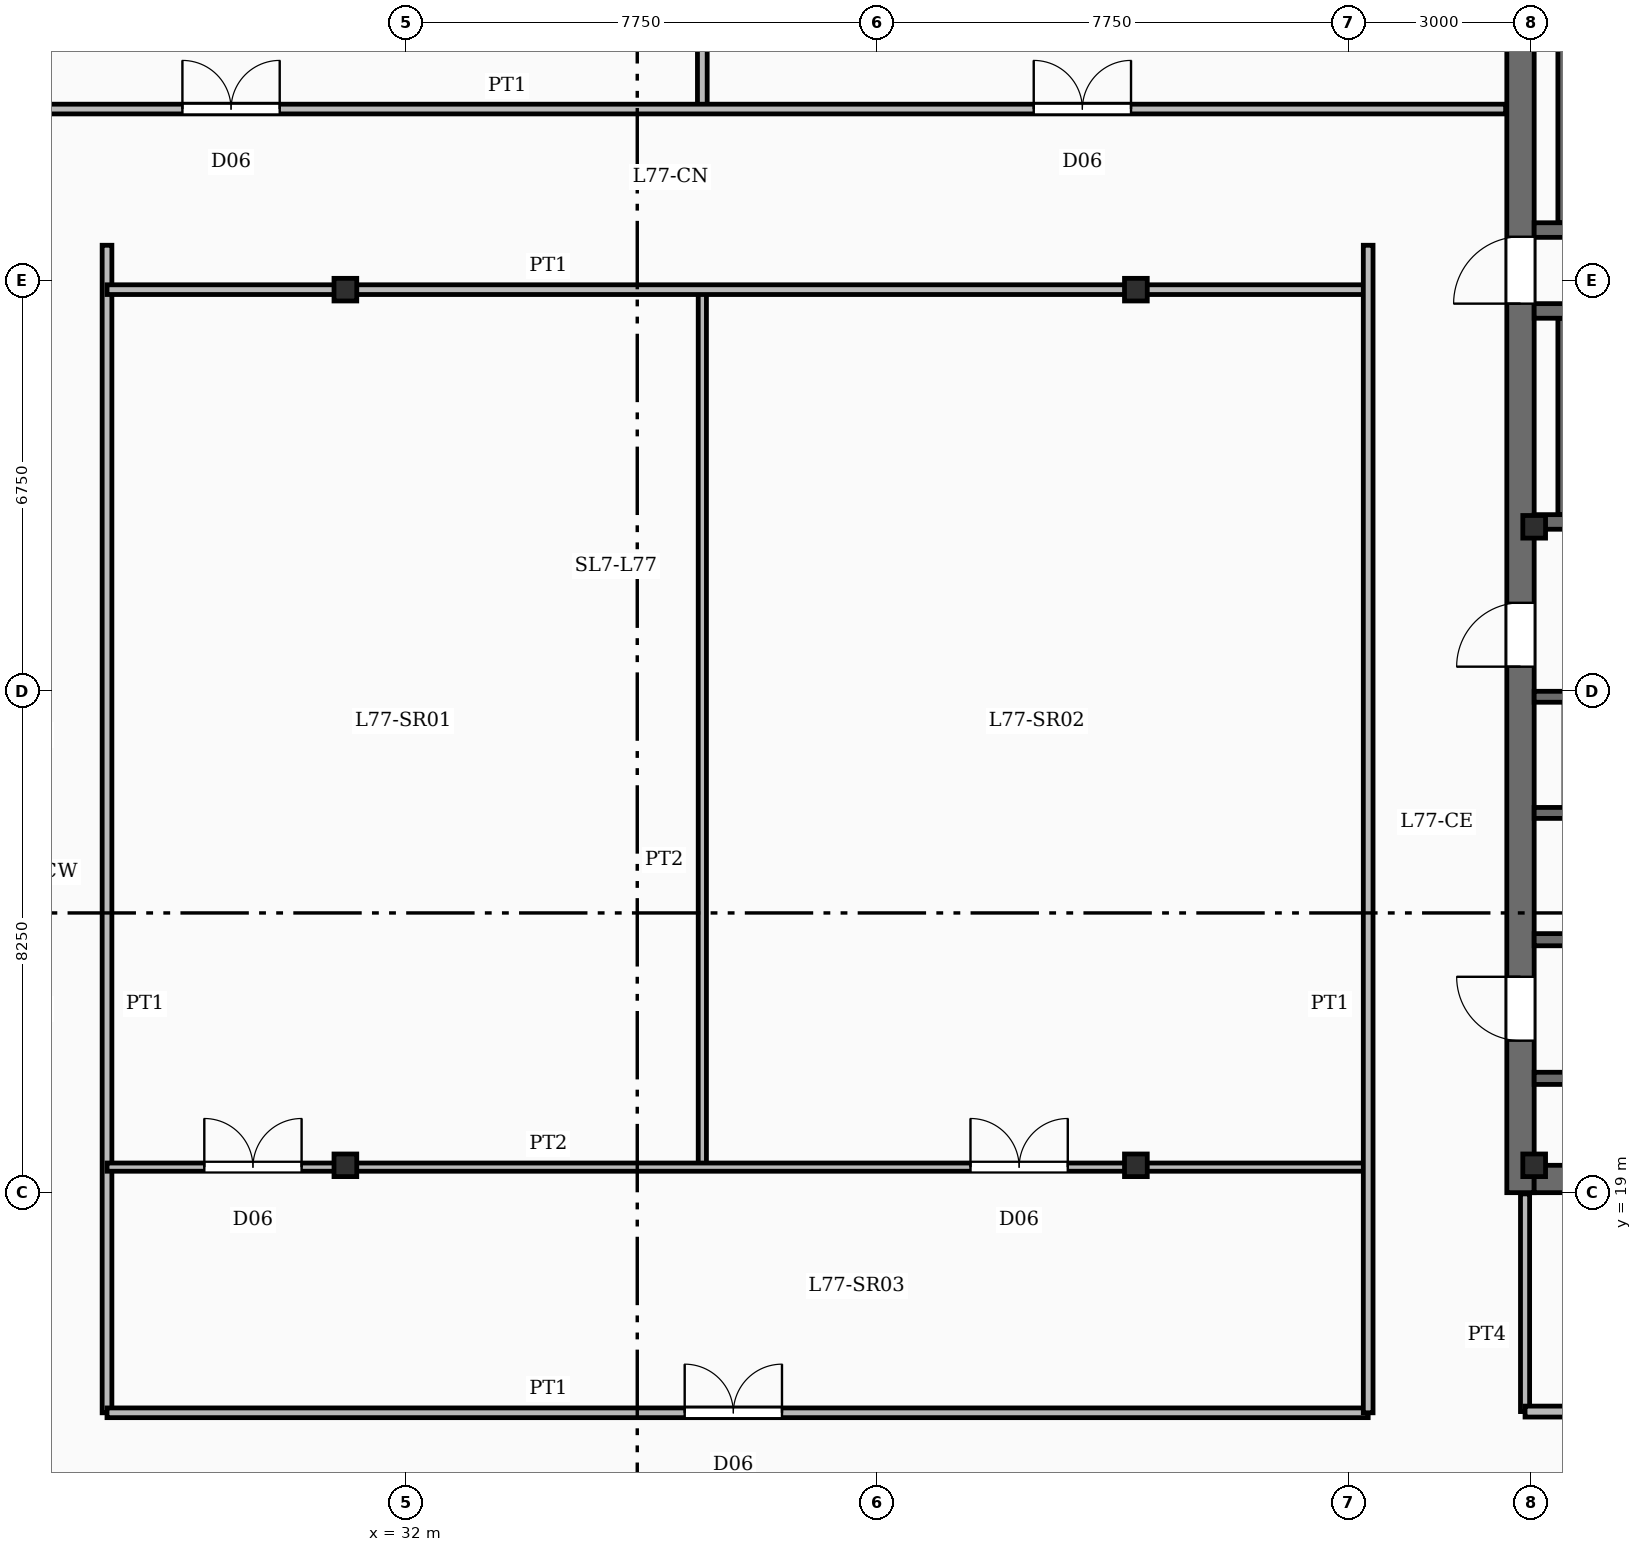
"""IFC4 building model, lengths in metres.
Left out: names, types, materials, properties, quantities, classifications, styles, units other than length and angle.
Written with IfcOpenShell. Run it as: python <this file> out.ifc"""

import sys

from ifc_helpers import new_model, si_unit, direction, frame, frame_2d, origin, origin_2d, place, context, subcontext, project, spatial, rectangle, i_section, extrude, element, fill, save


model = new_model("IFC4")
c1 = context("Model", 3, precision=1e-05, world=origin(), true_north=direction((0.0, 1.0)))
c2 = subcontext(c1, "Body", "Model", "MODEL_VIEW")
j1 = project(units=[si_unit("LENGTHUNIT", "METRE"), si_unit("PLANEANGLEUNIT", "RADIAN")], contexts=[c1])
p1 = place(None, origin())
s1 = spatial("IfcSite", under=j1, at=p1, CompositionType="ELEMENT")
p2 = place(p1, origin())
s2 = spatial("IfcBuilding", under=s1, at=p2, CompositionType="ELEMENT")
p3 = place(p2, frame((0.0, 0.0, 312.4)))
s3 = spatial("IfcBuildingStorey", under=s2, at=p3, CompositionType="ELEMENT", Elevation=312.4)
p4 = place(p3, frame((50.325, 19.0, -0.24), z_axis=(0.0, 0.0, 1.0), x_axis=(0.0, 1.0, 0.0)))
e1 = element("IfcWall", 1, at=p4, inside=s3, PredefinedType="SHEAR", context=c2, shape_type="SweptSolid", body=[
    extrude(rectangle(XDim=20.8, YDim=0.45, at=frame_2d((10.4, 0.0))), origin(), (0.0, 0.0, 1.0), 4.8),
])
p5 = place(p4, frame((2.5, 0.0, 0.24)))
e2 = element("IfcOpeningElement", 2, at=p5, cuts=e1, PredefinedType="OPENING", context=c2, shape_type="SweptSolid", body=[
    extrude(rectangle(XDim=1.05, YDim=2.15, at=frame_2d((0.525, 1.075))), frame((0.0, 0.235, 0.0), z_axis=(0.0, -1.0, 0.0), x_axis=(1.0, 0.0, 0.0)), (0.0, 0.0, 1.0), 0.47),
])
p6 = place(p4, frame((8.65, 0.0, 0.24)))
e3 = element("IfcOpeningElement", 3, at=p6, cuts=e1, PredefinedType="OPENING", context=c2, shape_type="SweptSolid", body=[
    extrude(rectangle(XDim=1.05, YDim=2.15, at=frame_2d((0.525, 1.075))), frame((0.0, 0.235, 0.0), z_axis=(0.0, -1.0, 0.0), x_axis=(1.0, 0.0, 0.0)), (0.0, 0.0, 1.0), 0.47),
])
p7 = place(p4, frame((14.62, 0.0, 0.24)))
e4 = element("IfcOpeningElement", 4, at=p7, cuts=e1, PredefinedType="OPENING", context=c2, shape_type="SweptSolid", body=[
    extrude(rectangle(XDim=1.1, YDim=2.15, at=frame_2d((0.55, 1.075))), frame((0.0, 0.235, 0.0), z_axis=(0.0, -1.0, 0.0), x_axis=(1.0, 0.0, 0.0)), (0.0, 0.0, 1.0), 0.47),
])
p8 = place(p3, frame((50.55, 19.225, -0.24), z_axis=(0.0, 0.0, 1.0), x_axis=(1.0, 0.0, 0.0)))
e5 = element("IfcWall", 5, at=p8, inside=s3, PredefinedType="SHEAR", context=c2, shape_type="SweptSolid", body=[
    extrude(rectangle(XDim=9.8, YDim=0.45, at=frame_2d((4.9, 0.0))), origin(), (0.0, 0.0, 1.0), 4.8),
])
for number, where, z_axis, x_axis in (
    (6, (50.55, 19.45, -0.24), (0.0, 0.0, 1.0), (1.0, 0.0, 0.0)),
    (7, (50.55, 29.95, -0.24), (0.0, 0.0, 1.0), (1.0, 0.0, 0.0)),
    (8, (31.0, 19.45, -0.24), (0.0, 0.0, 1.0), (1.0, 0.0, 0.0)),
    (9, (44.0, 19.45, -0.24), (0.0, 0.0, 1.0), (1.0, 0.0, 0.0)),
    (10, (31.0, 33.85, -0.24), (0.0, 0.0, 1.0), (1.0, 0.0, 0.0)),
    (11, (44.0, 33.85, -0.24), (0.0, 0.0, 1.0), (1.0, 0.0, 0.0)),
):
    element("IfcColumn", number, at=place(p3, frame(where, z_axis=z_axis, x_axis=x_axis)), inside=s3, PredefinedType="COLUMN", context=c2, shape_type="SweptSolid", body=[
        extrude(i_section(OverallWidth=0.374, OverallDepth=0.372, WebThickness=0.016, FlangeThickness=0.026, FilletRadius=0.02, at=origin_2d()), origin(), (0.0, 0.0, 1.0), 4.8),
    ])
p9 = place(p3, frame((60.35, 30.03, 0.0), z_axis=(0.0, 0.0, 1.0), x_axis=(-1.0, 0.0, 0.0)))
e12 = element("IfcWall", 12, at=p9, inside=s3, PredefinedType="SOLIDWALL", context=c2, shape_type="SweptSolid", body=[
    extrude(rectangle(XDim=9.8, YDim=0.24, at=frame_2d((4.9, 0.0))), origin(), (0.0, 0.0, 1.0), 4.56),
])
p10 = place(p9, frame((7.83, 0.0, 0.0)))
e13 = element("IfcOpeningElement", 13, at=p10, cuts=e12, PredefinedType="OPENING", context=c2, shape_type="SweptSolid", body=[
    extrude(rectangle(XDim=1.1, YDim=2.15, at=frame_2d((0.55, 1.075))), frame((0.0, 0.13, 0.0), z_axis=(0.0, -1.0, 0.0), x_axis=(1.0, 0.0, 0.0)), (0.0, 0.0, 1.0), 0.26),
])
p11 = place(p3, frame((50.55, 33.5, 0.0), z_axis=(0.0, 0.0, 1.0), x_axis=(1.0, 0.0, 0.0)))
e14 = element("IfcWall", 14, at=p11, inside=s3, PredefinedType="SOLIDWALL", context=c2, shape_type="SweptSolid", body=[
    extrude(rectangle(XDim=9.8, YDim=0.24, at=frame_2d((4.9, 0.0))), origin(), (0.0, 0.0, 1.0), 4.56),
])
p12 = place(p3, frame((51.06, 30.15, 0.0), z_axis=(0.0, 0.0, 1.0), x_axis=(0.0, 1.0, 0.0)))
e15 = element("IfcWall", 15, at=p12, inside=s3, PredefinedType="SOLIDWALL", context=c2, shape_type="SweptSolid", body=[
    extrude(rectangle(XDim=3.23, YDim=0.24, at=frame_2d((1.615, 0.0))), origin(), (0.0, 0.0, 1.0), 4.56),
])
p13 = place(p3, frame((60.35, 34.83, 0.0), z_axis=(0.0, 0.0, 1.0), x_axis=(-1.0, 0.0, 0.0)))
e16 = element("IfcWall", 16, at=p13, inside=s3, PredefinedType="SOLIDWALL", context=c2, shape_type="SweptSolid", body=[
    extrude(rectangle(XDim=9.8, YDim=0.24, at=frame_2d((4.9, 0.0))), origin(), (0.0, 0.0, 1.0), 4.56),
])
p14 = place(p13, frame((7.87, 0.0, 0.0)))
e17 = element("IfcOpeningElement", 17, at=p14, cuts=e16, PredefinedType="OPENING", context=c2, shape_type="SweptSolid", body=[
    extrude(rectangle(XDim=1.1, YDim=2.15, at=frame_2d((0.55, 1.075))), frame((0.0, 0.13, 0.0), z_axis=(0.0, -1.0, 0.0), x_axis=(1.0, 0.0, 0.0)), (0.0, 0.0, 1.0), 0.26),
])
p15 = place(p3, frame((51.06, 34.95, 0.0), z_axis=(0.0, 0.0, 1.0), x_axis=(0.0, 1.0, 0.0)))
e18 = element("IfcWall", 18, at=p15, inside=s3, PredefinedType="SOLIDWALL", context=c2, shape_type="SweptSolid", body=[
    extrude(rectangle(XDim=3.15, YDim=0.24, at=frame_2d((1.575, 0.0))), origin(), (0.0, 0.0, 1.0), 4.56),
])
p16 = place(p3, frame((50.55, 27.155, 0.0), z_axis=(0.0, 0.0, 1.0), x_axis=(1.0, 0.0, 0.0)))
e19 = element("IfcWall", 19, at=p16, inside=s3, PredefinedType="SOLIDWALL", context=c2, shape_type="SweptSolid", body=[
    extrude(rectangle(XDim=3.315, YDim=0.18, at=frame_2d((1.657, 0.0))), origin(), (0.0, 0.0, 1.0), 4.56),
])
p17 = place(p16, frame((1.235, 0.0, 0.0)))
e20 = element("IfcOpeningElement", 20, at=p17, cuts=e19, PredefinedType="OPENING", context=c2, shape_type="SweptSolid", body=[
    extrude(rectangle(XDim=1.35, YDim=2.3, at=frame_2d((0.675, 1.15))), frame((0.0, 0.1, 0.0), z_axis=(0.0, -1.0, 0.0), x_axis=(1.0, 0.0, 0.0)), (0.0, 0.0, 1.0), 0.2),
])
p18 = place(p3, frame((50.55, 25.245, 0.0), z_axis=(0.0, 0.0, 1.0), x_axis=(1.0, 0.0, 0.0)))
e21 = element("IfcWall", 21, at=p18, inside=s3, PredefinedType="SOLIDWALL", context=c2, shape_type="SweptSolid", body=[
    extrude(rectangle(XDim=3.315, YDim=0.18, at=frame_2d((1.657, 0.0))), origin(), (0.0, 0.0, 1.0), 4.56),
])
p19 = place(p3, frame((50.55, 20.88, 0.0), z_axis=(0.0, 0.0, 1.0), x_axis=(1.0, 0.0, 0.0)))
e22 = element("IfcWall", 22, at=p19, inside=s3, PredefinedType="SOLIDWALL", context=c2, shape_type="SweptSolid", body=[
    extrude(rectangle(XDim=9.8, YDim=0.2, at=frame_2d((4.9, 0.0))), origin(), (0.0, 0.0, 1.0), 3.62),
])
p20 = place(p19, frame((1.4, 0.0, 0.0)))
e23 = element("IfcOpeningElement", 23, at=p20, cuts=e22, PredefinedType="OPENING", context=c2, shape_type="SweptSolid", body=[
    extrude(rectangle(XDim=1.05, YDim=2.15, at=frame_2d((0.525, 1.075))), frame((0.0, 0.11, 0.0), z_axis=(0.0, -1.0, 0.0), x_axis=(1.0, 0.0, 0.0)), (0.0, 0.0, 1.0), 0.22),
])
p21 = place(p19, frame((5.5, 0.0, 0.0)))
e24 = element("IfcOpeningElement", 24, at=p21, cuts=e22, PredefinedType="OPENING", context=c2, shape_type="SweptSolid", body=[
    extrude(rectangle(XDim=1.05, YDim=2.15, at=frame_2d((0.525, 1.075))), frame((0.0, 0.11, 0.0), z_axis=(0.0, -1.0, 0.0), x_axis=(1.0, 0.0, 0.0)), (0.0, 0.0, 1.0), 0.22),
])
p22 = place(p3, frame((50.55, 23.16, 0.0), z_axis=(0.0, 0.0, 1.0), x_axis=(1.0, 0.0, 0.0)))
e25 = element("IfcWall", 25, at=p22, inside=s3, PredefinedType="SOLIDWALL", context=c2, shape_type="SweptSolid", body=[
    extrude(rectangle(XDim=3.33, YDim=0.2, at=frame_2d((1.665, 0.0))), origin(), (0.0, 0.0, 1.0), 3.62),
])
p23 = place(p22, frame((0.55, 0.0, 0.0)))
e26 = element("IfcOpeningElement", 26, at=p23, cuts=e25, PredefinedType="OPENING", context=c2, shape_type="SweptSolid", body=[
    extrude(rectangle(XDim=0.86, YDim=2.05, at=frame_2d((0.43, 1.025))), frame((0.0, 0.11, 0.0), z_axis=(0.0, -1.0, 0.0), x_axis=(1.0, 0.0, 0.0)), (0.0, 0.0, 1.0), 0.22),
])
p24 = place(p3, frame((50.4, 15.4, 0.0), z_axis=(0.0, 0.0, 1.0), x_axis=(1.0, 0.0, 0.0)))
e27 = element("IfcWall", 27, at=p24, inside=s3, PredefinedType="SOLIDWALL", context=c2, shape_type="SweptSolid", body=[
    extrude(rectangle(XDim=10.0, YDim=0.18, at=frame_2d((5.0, 0.0))), origin(), (0.0, 0.0, 1.0), 3.62),
])
p25 = place(p24, frame((1.94, 0.0, 0.0)))
e28 = element("IfcOpeningElement", 28, at=p25, cuts=e27, PredefinedType="OPENING", context=c2, shape_type="SweptSolid", body=[
    extrude(rectangle(XDim=0.92, YDim=2.1, at=frame_2d((0.46, 1.05))), frame((0.0, 0.1, 0.0), z_axis=(0.0, -1.0, 0.0), x_axis=(1.0, 0.0, 0.0)), (0.0, 0.0, 1.0), 0.2),
])
p26 = place(p24, frame((6.97, 0.0, 0.0)))
e29 = element("IfcOpeningElement", 29, at=p26, cuts=e27, PredefinedType="OPENING", context=c2, shape_type="SweptSolid", body=[
    extrude(rectangle(XDim=0.86, YDim=2.05, at=frame_2d((0.43, 1.025))), frame((0.0, 0.1, 0.0), z_axis=(0.0, -1.0, 0.0), x_axis=(1.0, 0.0, 0.0)), (0.0, 0.0, 1.0), 0.2),
])
p27 = place(p3, frame((50.4, 15.4, 0.0), z_axis=(0.0, 0.0, 1.0), x_axis=(0.0, 1.0, 0.0)))
e30 = element("IfcWall", 30, at=p27, inside=s3, PredefinedType="PARTITIONING", context=c2, shape_type="SweptSolid", body=[
    extrude(rectangle(XDim=3.58, YDim=0.15, at=frame_2d((1.79, 0.0))), origin(), (0.0, 0.0, 1.0), 3.62),
])
p28 = place(p3, frame((27.08, 19.42, 0.0), z_axis=(0.0, 0.0, 1.0), x_axis=(1.0, 0.0, 0.0)))
e31 = element("IfcWall", 31, at=p28, inside=s3, PredefinedType="PARTITIONING", context=c2, shape_type="SweptSolid", body=[
    extrude(rectangle(XDim=20.74, YDim=0.135, at=frame_2d((10.37, 0.0))), origin(), (0.0, 0.0, 1.0), 3.62),
])
p29 = place(p28, frame((1.6, 0.0, 0.0)))
e32 = element("IfcOpeningElement", 32, at=p29, cuts=e31, PredefinedType="OPENING", context=c2, shape_type="SweptSolid", body=[
    extrude(rectangle(XDim=1.6, YDim=2.15, at=frame_2d((0.8, 1.075))), frame((0.0, 0.077, 0.0), z_axis=(0.0, -1.0, 0.0), x_axis=(1.0, 0.0, 0.0)), (0.0, 0.0, 1.0), 0.155),
])
p30 = place(p28, frame((14.2, 0.0, 0.0)))
e33 = element("IfcOpeningElement", 33, at=p30, cuts=e31, PredefinedType="OPENING", context=c2, shape_type="SweptSolid", body=[
    extrude(rectangle(XDim=1.6, YDim=2.15, at=frame_2d((0.8, 1.075))), frame((0.0, 0.077, 0.0), z_axis=(0.0, -1.0, 0.0), x_axis=(1.0, 0.0, 0.0)), (0.0, 0.0, 1.0), 0.155),
])
p31 = place(p3, frame((27.08, 33.85, 0.0), z_axis=(0.0, 0.0, 1.0), x_axis=(1.0, 0.0, 0.0)))
e34 = element("IfcWall", 34, at=p31, inside=s3, PredefinedType="PARTITIONING", context=c2, shape_type="SweptSolid", body=[
    extrude(rectangle(XDim=20.74, YDim=0.16, at=frame_2d((10.37, 0.0))), origin(), (0.0, 0.0, 1.0), 3.62),
])
p32 = place(p3, frame((36.87, 19.42, 0.0), z_axis=(0.0, 0.0, 1.0), x_axis=(0.0, 1.0, 0.0)))
e35 = element("IfcWall", 35, at=p32, inside=s3, PredefinedType="PARTITIONING", context=c2, shape_type="SweptSolid", body=[
    extrude(rectangle(XDim=14.43, YDim=0.135, at=frame_2d((7.215, 0.0))), origin(), (0.0, 0.0, 1.0), 3.62),
])
p33 = place(p3, frame((27.08, 15.38, 0.0), z_axis=(0.0, 0.0, 1.0), x_axis=(1.0, 0.0, 0.0)))
e36 = element("IfcWall", 36, at=p33, inside=s3, PredefinedType="PARTITIONING", context=c2, shape_type="SweptSolid", body=[
    extrude(rectangle(XDim=20.74, YDim=0.16, at=frame_2d((10.37, 0.0))), origin(), (0.0, 0.0, 1.0), 3.62),
])
p34 = place(p33, frame((9.5, 0.0, 0.0)))
e37 = element("IfcOpeningElement", 37, at=p34, cuts=e36, PredefinedType="OPENING", context=c2, shape_type="SweptSolid", body=[
    extrude(rectangle(XDim=1.6, YDim=2.15, at=frame_2d((0.8, 1.075))), frame((0.0, 0.09, 0.0), z_axis=(0.0, -1.0, 0.0), x_axis=(1.0, 0.0, 0.0)), (0.0, 0.0, 1.0), 0.18),
])
for number, where, z_axis, x_axis in (
    (38, (27.08, 15.38, 0.0), (0.0, 0.0, 1.0), (0.0, 1.0, 0.0)),
    (39, (47.82, 15.38, 0.0), (0.0, 0.0, 1.0), (0.0, 1.0, 0.0)),
):
    element("IfcWall", number, at=place(p3, frame(where, z_axis=z_axis, x_axis=x_axis)), inside=s3, PredefinedType="PARTITIONING", context=c2, shape_type="SweptSolid", body=[
        extrude(rectangle(XDim=19.2, YDim=0.16, at=frame_2d((9.6, 0.0))), origin(), (0.0, 0.0, 1.0), 3.62),
    ])
p35 = place(p3, frame((24.82, 36.82, 0.0), z_axis=(0.0, 0.0, 1.0), x_axis=(1.0, 0.0, 0.0)))
e40 = element("IfcWall", 40, at=p35, inside=s3, PredefinedType="PARTITIONING", context=c2, shape_type="SweptSolid", body=[
    extrude(rectangle(XDim=25.26, YDim=0.16, at=frame_2d((12.63, 0.0))), origin(), (0.0, 0.0, 1.0), 3.62),
])
p36 = place(p35, frame((3.5, 0.0, 0.0)))
e41 = element("IfcOpeningElement", 41, at=p36, cuts=e40, PredefinedType="OPENING", context=c2, shape_type="SweptSolid", body=[
    extrude(rectangle(XDim=1.6, YDim=2.15, at=frame_2d((0.8, 1.075))), frame((0.0, 0.09, 0.0), z_axis=(0.0, -1.0, 0.0), x_axis=(1.0, 0.0, 0.0)), (0.0, 0.0, 1.0), 0.18),
])
p37 = place(p35, frame((17.5, 0.0, 0.0)))
e42 = element("IfcOpeningElement", 42, at=p37, cuts=e40, PredefinedType="OPENING", context=c2, shape_type="SweptSolid", body=[
    extrude(rectangle(XDim=1.6, YDim=2.15, at=frame_2d((0.8, 1.075))), frame((0.0, 0.09, 0.0), z_axis=(0.0, -1.0, 0.0), x_axis=(1.0, 0.0, 0.0)), (0.0, 0.0, 1.0), 0.18),
])
p38 = place(p3, frame((36.87, 36.82, 0.0), z_axis=(0.0, 0.0, 1.0), x_axis=(0.0, 1.0, 0.0)))
e43 = element("IfcWall", 43, at=p38, inside=s3, PredefinedType="PARTITIONING", context=c2, shape_type="SweptSolid", body=[
    extrude(rectangle(XDim=15.037, YDim=0.16, at=frame_2d((7.518, 0.0))), origin(), (0.0, 0.0, 1.0), 3.62),
])
p39 = place(p5, origin())
e44 = element("IfcDoor", 44, at=p39, inside=s3, OperationType="SINGLE_SWING_RIGHT", PredefinedType="DOOR", context=c2, shape_type="SweptSolid", body=[
    extrude(rectangle(XDim=1.05, YDim=2.15, at=frame_2d((0.525, 1.075))), frame((0.0, 0.025, 0.0), z_axis=(0.0, -1.0, 0.0), x_axis=(1.0, 0.0, 0.0)), (0.0, 0.0, 1.0), 0.05),
])
fill(e2, e44)
p40 = place(p6, origin())
e45 = element("IfcDoor", 45, at=p40, inside=s3, OperationType="SINGLE_SWING_LEFT", PredefinedType="DOOR", context=c2, shape_type="SweptSolid", body=[
    extrude(rectangle(XDim=1.05, YDim=2.15, at=frame_2d((0.525, 1.075))), frame((0.0, 0.025, 0.0), z_axis=(0.0, -1.0, 0.0), x_axis=(1.0, 0.0, 0.0)), (0.0, 0.0, 1.0), 0.05),
])
fill(e3, e45)
p41 = place(p7, origin())
e46 = element("IfcDoor", 46, at=p41, inside=s3, OperationType="SINGLE_SWING_LEFT", PredefinedType="DOOR", context=c2, shape_type="SweptSolid", body=[
    extrude(rectangle(XDim=1.1, YDim=2.15, at=frame_2d((0.55, 1.075))), frame((0.0, 0.025, 0.0), z_axis=(0.0, -1.0, 0.0), x_axis=(1.0, 0.0, 0.0)), (0.0, 0.0, 1.0), 0.05),
])
fill(e4, e46)
p42 = place(p29, origin())
e47 = element("IfcDoor", 47, at=p42, inside=s3, OperationType="DOUBLE_DOOR_SINGLE_SWING", PredefinedType="DOOR", context=c2, shape_type="SweptSolid", body=[
    extrude(rectangle(XDim=1.6, YDim=2.15, at=frame_2d((0.8, 1.075))), frame((0.0, 0.025, 0.0), z_axis=(0.0, -1.0, 0.0), x_axis=(1.0, 0.0, 0.0)), (0.0, 0.0, 1.0), 0.05),
])
fill(e32, e47)
p43 = place(p30, origin())
e48 = element("IfcDoor", 48, at=p43, inside=s3, OperationType="DOUBLE_DOOR_SINGLE_SWING", PredefinedType="DOOR", context=c2, shape_type="SweptSolid", body=[
    extrude(rectangle(XDim=1.6, YDim=2.15, at=frame_2d((0.8, 1.075))), frame((0.0, 0.025, 0.0), z_axis=(0.0, -1.0, 0.0), x_axis=(1.0, 0.0, 0.0)), (0.0, 0.0, 1.0), 0.05),
])
fill(e33, e48)
p44 = place(p34, origin())
e49 = element("IfcDoor", 49, at=p44, inside=s3, OperationType="DOUBLE_DOOR_SINGLE_SWING", PredefinedType="DOOR", context=c2, shape_type="SweptSolid", body=[
    extrude(rectangle(XDim=1.6, YDim=2.15, at=frame_2d((0.8, 1.075))), frame((0.0, 0.025, 0.0), z_axis=(0.0, -1.0, 0.0), x_axis=(1.0, 0.0, 0.0)), (0.0, 0.0, 1.0), 0.05),
])
fill(e37, e49)
p45 = place(p36, origin())
e50 = element("IfcDoor", 50, at=p45, inside=s3, OperationType="DOUBLE_DOOR_SINGLE_SWING", PredefinedType="DOOR", context=c2, shape_type="SweptSolid", body=[
    extrude(rectangle(XDim=1.6, YDim=2.15, at=frame_2d((0.8, 1.075))), frame((0.0, 0.025, 0.0), z_axis=(0.0, -1.0, 0.0), x_axis=(1.0, 0.0, 0.0)), (0.0, 0.0, 1.0), 0.05),
])
fill(e41, e50)
p46 = place(p37, origin())
e51 = element("IfcDoor", 51, at=p46, inside=s3, OperationType="DOUBLE_DOOR_SINGLE_SWING", PredefinedType="DOOR", context=c2, shape_type="SweptSolid", body=[
    extrude(rectangle(XDim=1.6, YDim=2.15, at=frame_2d((0.8, 1.075))), frame((0.0, 0.025, 0.0), z_axis=(0.0, -1.0, 0.0), x_axis=(1.0, 0.0, 0.0)), (0.0, 0.0, 1.0), 0.05),
])
fill(e42, e51)
save(model, sys.argv[1])
